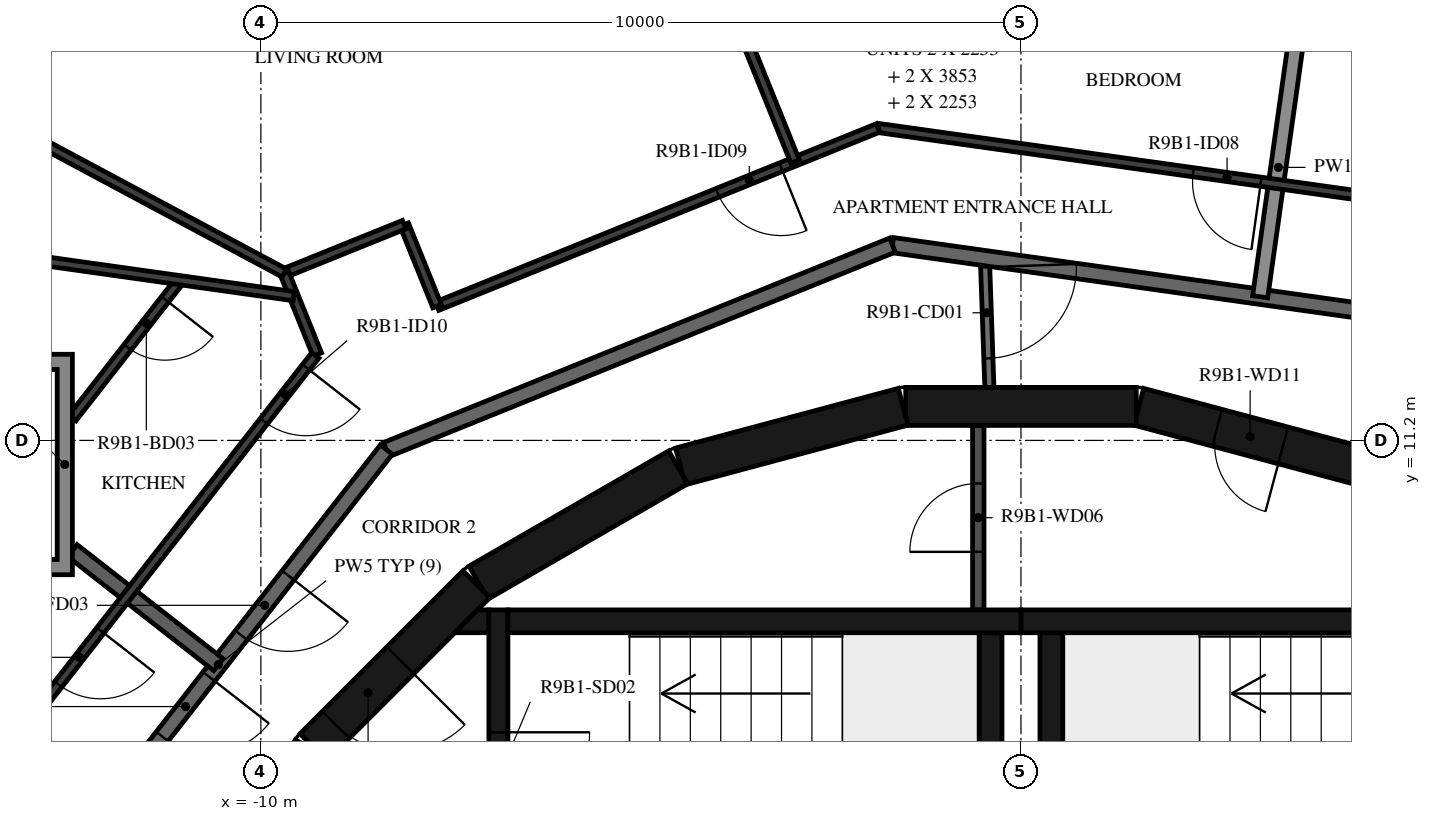
"""IFC4 building model, lengths in metres.
Left out: names, types, materials, properties, quantities, classifications, styles, units other than length and angle.
Written with IfcOpenShell. Run it as: python <this file> out.ifc"""

import sys

from ifc_helpers import new_model, si_unit, direction, frame, frame_2d, origin, place, context, subcontext, project, spatial, polyline, rectangle, outline, extrude, element, fill, save


model = new_model("IFC4")
c1 = context("Model", 3, precision=1e-05, world=origin(), true_north=direction((0.0, 1.0)))
c2 = subcontext(c1, "Body", "Model", "MODEL_VIEW")
j1 = project(units=[si_unit("LENGTHUNIT", "METRE"), si_unit("PLANEANGLEUNIT", "RADIAN")], contexts=[c1])
p1 = place(None, origin())
s1 = spatial("IfcSite", under=j1, at=p1, CompositionType="ELEMENT")
p2 = place(p1, origin())
s2 = spatial("IfcBuilding", under=s1, at=p2, CompositionType="ELEMENT")
p3 = place(p2, frame((0.0, 0.0, 350.5)))
s3 = spatial("IfcBuildingStorey", under=s2, at=p3, CompositionType="ELEMENT", Elevation=350.5)
p4 = place(p3, frame((4.479, 10.858, 0.0), z_axis=(0.0, 0.0, 1.0), x_axis=(-0.965948410781, 0.258734743916, 0.0)))
e1 = element("IfcWall", 1, at=p4, inside=s3, PredefinedType="SHEAR", context=c2, shape_type="SweptSolid", body=[
    extrude(rectangle(XDim=3.033, YDim=0.5, at=frame_2d((1.516, 0.0))), origin(), (0.0, 0.0, 1.0), 3.12),
])
p5 = place(p4, frame((1.066, 0.0, 0.0)))
e2 = element("IfcOpeningElement", 2, at=p5, cuts=e1, PredefinedType="OPENING", context=c2, shape_type="SweptSolid", body=[
    extrude(rectangle(XDim=0.9, YDim=2.1, at=frame_2d((0.45, 1.05))), frame((0.0, 0.26, 0.0), z_axis=(0.0, -1.0, 0.0), x_axis=(1.0, 0.0, 0.0)), (0.0, 0.0, 1.0), 0.52),
])
for number, where, z_axis, x_axis in (
    (3, (1.516, 11.647, 0.0), (0.0, 0.0, 1.0), (-1.0, 0.0, 0.0)),
    (4, (-1.55, 11.643, 0.0), (0.0, 0.0, 1.0), (-0.966, -0.259, 0.0)),
    (5, (-4.51, 10.845, 0.0), (0.0, 0.0, 1.0), (-0.866, -0.5, 0.0)),
):
    element("IfcWall", number, at=place(p3, frame(where, z_axis=z_axis, x_axis=x_axis)), inside=s3, PredefinedType="SHEAR", context=c2, shape_type="SweptSolid", body=[
        extrude(rectangle(XDim=3.033, YDim=0.5, at=frame_2d((1.516, 0.0))), origin(), (0.0, 0.0, 1.0), 3.12),
    ])
p6 = place(p3, frame((-7.164, 9.308, 0.0), z_axis=(0.0, 0.0, 1.0), x_axis=(-0.707106781187, -0.707106781187, 0.0)))
e6 = element("IfcWall", 6, at=p6, inside=s3, PredefinedType="SHEAR", context=c2, shape_type="SweptSolid", body=[
    extrude(rectangle(XDim=3.032, YDim=0.5, at=frame_2d((1.516, 0.0))), origin(), (0.0, 0.0, 1.0), 3.12),
])
p7 = place(p6, frame((1.416, 0.0, 0.0)))
e7 = element("IfcOpeningElement", 7, at=p7, cuts=e6, PredefinedType="OPENING", context=c2, shape_type="SweptSolid", body=[
    extrude(rectangle(XDim=1.2, YDim=2.1, at=frame_2d((0.6, 1.05))), frame((0.0, 0.26, 0.0), z_axis=(0.0, -1.0, 0.0), x_axis=(1.0, 0.0, 0.0)), (0.0, 0.0, 1.0), 0.52),
])
p8 = place(p3, frame((-9.329, 7.137, 0.0), z_axis=(0.0, 0.0, 1.0), x_axis=(-0.500087131594, -0.865975092491, 0.0)))
e8 = element("IfcWall", 8, at=p8, inside=s3, PredefinedType="SHEAR", context=c2, shape_type="SweptSolid", body=[
    extrude(rectangle(XDim=3.033, YDim=0.5, at=frame_2d((1.516, 0.0))), origin(), (0.0, 0.0, 1.0), 3.12),
])
p9 = place(p3, frame((0.0, 8.82, 0.0), z_axis=(0.0, 0.0, 1.0), x_axis=(1.0, 0.0, 0.0)))
e9 = element("IfcWall", 9, at=p9, inside=s3, PredefinedType="SHEAR", context=c2, shape_type="SweptSolid", body=[
    extrude(rectangle(XDim=6.75, YDim=0.3, at=frame_2d((3.375, 0.0))), origin(), (0.0, 0.0, 1.0), 3.12),
])
p10 = place(p3, frame((0.4, 5.35, 0.0), z_axis=(0.0, 0.0, 1.0), x_axis=(0.0, 1.0, 0.0)))
e10 = element("IfcWall", 10, at=p10, inside=s3, PredefinedType="SHEAR", context=c2, shape_type="SweptSolid", body=[
    extrude(rectangle(XDim=3.32, YDim=0.3, at=frame_2d((1.66, 0.0))), origin(), (0.0, 0.0, 1.0), 3.12),
])
p11 = place(p3, frame((-6.75, 8.82, 0.0), z_axis=(0.0, 0.0, 1.0), x_axis=(1.0, 0.0, 0.0)))
e11 = element("IfcWall", 11, at=p11, inside=s3, PredefinedType="SHEAR", context=c2, shape_type="SweptSolid", body=[
    extrude(rectangle(XDim=6.75, YDim=0.3, at=frame_2d((3.375, 0.0))), origin(), (0.0, 0.0, 1.0), 3.12),
])
p12 = place(p3, frame((-0.4, 5.35, 0.0), z_axis=(0.0, 0.0, 1.0), x_axis=(0.0, 1.0, 0.0)))
e12 = element("IfcWall", 12, at=p12, inside=s3, PredefinedType="SHEAR", context=c2, shape_type="SweptSolid", body=[
    extrude(rectangle(XDim=3.32, YDim=0.3, at=frame_2d((1.66, 0.0))), origin(), (0.0, 0.0, 1.0), 3.12),
])
p13 = place(p3, frame((-6.875, 8.97, 0.0), z_axis=(0.0, 0.0, 1.0), x_axis=(0.0, -1.0, 0.0)))
e13 = element("IfcWall", 13, at=p13, inside=s3, PredefinedType="SHEAR", context=c2, shape_type="SweptSolid", body=[
    extrude(rectangle(XDim=3.92, YDim=0.25, at=frame_2d((1.96, 0.0))), origin(), (0.0, 0.0, 1.0), 3.12),
])
p14 = place(p13, frame((1.61, 0.0, 0.0)))
e14 = element("IfcOpeningElement", 14, at=p14, cuts=e13, PredefinedType="OPENING", context=c2, shape_type="SweptSolid", body=[
    extrude(rectangle(XDim=1.2, YDim=2.1, at=frame_2d((0.6, 1.05))), frame((0.0, 0.135, 0.0), z_axis=(0.0, -1.0, 0.0), x_axis=(1.0, 0.0, 0.0)), (0.0, 0.0, 1.0), 0.27),
])
p15 = place(p3, origin())
e15 = element("IfcWall", 15, at=p15, inside=s3, PredefinedType="SHEAR", context=c2, shape_type="SweptSolid", body=[
    extrude(outline(polyline([(-7.148, 8.97), (-7.0, 8.97), (-7.0, 8.67), (-7.448, 8.67), (-7.148, 8.97)])), origin(), (0.0, 0.0, 1.0), 3.12),
])
p16 = place(p3, frame((-0.562, 8.97, 0.0), z_axis=(0.0, 0.0, 1.0), x_axis=(0.0, 1.0, 0.0)))
e16 = element("IfcWall", 16, at=p16, inside=s3, PredefinedType="PARTITIONING", context=c2, shape_type="SweptSolid", body=[
    extrude(rectangle(XDim=2.427, YDim=0.15, at=frame_2d((1.214, 0.0))), origin(), (0.0, 0.0, 1.0), 3.12),
])
p17 = place(p16, frame((0.764, 0.0, 0.0)))
e17 = element("IfcOpeningElement", 17, at=p17, cuts=e16, PredefinedType="OPENING", context=c2, shape_type="SweptSolid", body=[
    extrude(rectangle(XDim=0.9, YDim=2.1, at=frame_2d((0.45, 1.05))), frame((0.0, 0.085, 0.0), z_axis=(0.0, -1.0, 0.0), x_axis=(1.0, 0.0, 0.0)), (0.0, 0.0, 1.0), 0.17),
])
p18 = place(p3, frame((-0.475, 13.598, 0.0), z_axis=(0.0, 0.0, 1.0), x_axis=(0.034852521429, -0.999392466326, 0.0)))
e18 = element("IfcWall", 18, at=p18, inside=s3, PredefinedType="PARTITIONING", context=c2, shape_type="SweptSolid", body=[
    extrude(rectangle(XDim=1.702, YDim=0.12, at=frame_2d((0.851, 0.0))), origin(), (0.0, 0.0, 1.0), 3.12),
])
p19 = place(p18, frame((0.12, 0.0, 0.0)))
e19 = element("IfcOpeningElement", 19, at=p19, cuts=e18, PredefinedType="OPENING", context=c2, shape_type="SweptSolid", body=[
    extrude(rectangle(XDim=1.2, YDim=2.1, at=frame_2d((0.6, 1.05))), frame((0.0, 0.07, 0.0), z_axis=(0.0, -1.0, 0.0), x_axis=(1.0, 0.0, 0.0)), (0.0, 0.0, 1.0), 0.14),
])
p20 = place(p3, frame((5.42, 12.77, 0.0), z_axis=(0.0, 0.0, 1.0), x_axis=(-0.990270565508, 0.139155334385, 0.0)))
e20 = element("IfcWall", 20, at=p20, inside=s3, PredefinedType="STANDARD", context=c2, shape_type="SweptSolid", body=[
    extrude(rectangle(XDim=7.181, YDim=0.2, at=frame_2d((3.59, 0.0))), origin(), (0.0, 0.0, 1.0), 3.12),
])
p21 = place(p3, frame((-1.691, 13.769, 0.0), z_axis=(0.0, 0.0, 1.0), x_axis=(-0.92717916932, -0.374618189599, 0.0)))
e21 = element("IfcWall", 21, at=p21, inside=s3, PredefinedType="STANDARD", context=c2, shape_type="SweptSolid", body=[
    extrude(rectangle(XDim=7.181, YDim=0.2, at=frame_2d((3.591, 0.0))), origin(), (0.0, 0.0, 1.0), 3.12),
])
p22 = place(p3, frame((-8.349, 11.079, 0.0), z_axis=(0.0, 0.0, 1.0), x_axis=(-0.615669112324, -0.78800478687, 0.0)))
e22 = element("IfcWall", 22, at=p22, inside=s3, PredefinedType="STANDARD", context=c2, shape_type="SweptSolid", body=[
    extrude(rectangle(XDim=7.181, YDim=0.2, at=frame_2d((3.591, 0.0))), origin(), (0.0, 0.0, 1.0), 3.12),
])
p23 = place(p22, frame((2.1, 0.0, 0.0)))
e23 = element("IfcOpeningElement", 23, at=p23, cuts=e22, PredefinedType="OPENING", context=c2, shape_type="SweptSolid", body=[
    extrude(rectangle(XDim=1.0, YDim=2.1, at=frame_2d((0.5, 1.05))), frame((0.0, 0.11, 0.0), z_axis=(0.0, -1.0, 0.0), x_axis=(1.0, 0.0, 0.0)), (0.0, 0.0, 1.0), 0.22),
])
p24 = place(p22, frame((3.79, 0.0, 0.0)))
e24 = element("IfcOpeningElement", 24, at=p24, cuts=e22, PredefinedType="OPENING", context=c2, shape_type="SweptSolid", body=[
    extrude(rectangle(XDim=1.0, YDim=2.1, at=frame_2d((0.5, 1.05))), frame((0.0, 0.11, 0.0), z_axis=(0.0, -1.0, 0.0), x_axis=(1.0, 0.0, 0.0)), (0.0, 0.0, 1.0), 0.22),
])
p25 = place(p3, frame((3.625, 16.494, 0.0), z_axis=(0.0, 0.0, 1.0), x_axis=(-0.139174320859, -0.990267897295, 0.0)))
e25 = element("IfcWall", 25, at=p25, inside=s3, PredefinedType="STANDARD", context=c2, shape_type="SweptSolid", body=[
    extrude(rectangle(XDim=3.438, YDim=0.2, at=frame_2d((1.719, 0.0))), origin(), (0.0, 0.0, 1.0), 2.73),
])
p26 = place(p3, frame((-12.479, 9.75, 0.0), z_axis=(0.0, 0.0, 1.0), x_axis=(0.788050197026, -0.615610986717, 0.0)))
e26 = element("IfcWall", 26, at=p26, inside=s3, PredefinedType="STANDARD", context=c2, shape_type="SweptSolid", body=[
    extrude(rectangle(XDim=2.437, YDim=0.2, at=frame_2d((1.218, 0.0))), origin(), (0.0, 0.0, 1.0), 3.12),
])
p27 = place(p3, frame((6.027, 14.199, 0.0), z_axis=(0.0, 0.0, 1.0), x_axis=(-0.990271593532, 0.139148018469, 0.0)))
e27 = element("IfcWall", 27, at=p27, inside=s3, PredefinedType="PARTITIONING", context=c2, shape_type="SweptSolid", body=[
    extrude(rectangle(XDim=7.985, YDim=0.12, at=frame_2d((3.992, 0.0))), origin(), (0.0, 0.0, 1.0), 3.12),
])
p28 = place(p27, frame((2.898, 0.0, 0.0)))
e28 = element("IfcOpeningElement", 28, at=p28, cuts=e27, PredefinedType="OPENING", context=c2, shape_type="SweptSolid", body=[
    extrude(rectangle(XDim=0.9, YDim=2.1, at=frame_2d((0.45, 1.05))), frame((0.0, 0.07, 0.0), z_axis=(0.0, -1.0, 0.0), x_axis=(1.0, 0.0, 0.0)), (0.0, 0.0, 1.0), 0.14),
])
p29 = place(p3, frame((-1.88, 15.311, 0.0), z_axis=(0.0, 0.0, 1.0), x_axis=(-0.927182163322, -0.374610779365, 0.0)))
e29 = element("IfcWall", 29, at=p29, inside=s3, PredefinedType="PARTITIONING", context=c2, shape_type="SweptSolid", body=[
    extrude(rectangle(XDim=6.257, YDim=0.12, at=frame_2d((3.128, 0.0))), origin(), (0.0, 0.0, 1.0), 3.12),
])
p30 = place(p29, frame((1.377, 0.0, 0.0)))
e30 = element("IfcOpeningElement", 30, at=p30, cuts=e29, PredefinedType="OPENING", context=c2, shape_type="SweptSolid", body=[
    extrude(rectangle(XDim=0.9, YDim=2.1, at=frame_2d((0.45, 1.05))), frame((0.0, 0.07, 0.0), z_axis=(0.0, -1.0, 0.0), x_axis=(1.0, 0.0, 0.0)), (0.0, 0.0, 1.0), 0.14),
])
p31 = place(p3, frame((-7.681, 12.967, 0.0), z_axis=(0.0, 0.0, 1.0), x_axis=(-0.374592224266, 0.927189659951, 0.0)))
e31 = element("IfcWall", 31, at=p31, inside=s3, PredefinedType="PARTITIONING", context=c2, shape_type="SweptSolid", body=[
    extrude(rectangle(XDim=1.156, YDim=0.12, at=frame_2d((0.578, 0.0))), origin(), (0.0, 0.0, 1.0), 3.12),
])
p32 = place(p3, frame((-8.115, 14.039, 0.0), z_axis=(0.0, 0.0, 1.0), x_axis=(-0.927153589835, -0.374681492546, 0.0)))
e32 = element("IfcWall", 32, at=p32, inside=s3, PredefinedType="PARTITIONING", context=c2, shape_type="SweptSolid", body=[
    extrude(rectangle(XDim=1.7, YDim=0.12, at=frame_2d((0.85, 0.0))), origin(), (0.0, 0.0, 1.0), 3.12),
])
p33 = place(p3, frame((-9.691, 13.402, 0.0), z_axis=(0.0, 0.0, 1.0), x_axis=(0.374484003097, -0.927233374844, 0.0)))
e33 = element("IfcWall", 33, at=p33, inside=s3, PredefinedType="PARTITIONING", context=c2, shape_type="SweptSolid", body=[
    extrude(rectangle(XDim=1.156, YDim=0.12, at=frame_2d((0.578, 0.0))), origin(), (0.0, 0.0, 1.0), 3.12),
])
p34 = place(p3, frame((-9.283, 12.319, 0.0), z_axis=(0.0, 0.0, 1.0), x_axis=(-0.61567489546, -0.788000268464, 0.0)))
e34 = element("IfcWall", 34, at=p34, inside=s3, PredefinedType="PARTITIONING", context=c2, shape_type="SweptSolid", body=[
    extrude(rectangle(XDim=7.985, YDim=0.12, at=frame_2d((3.992, 0.0))), origin(), (0.0, 0.0, 1.0), 3.12),
])
p35 = place(p34, frame((0.2, 0.0, 0.0)))
e35 = element("IfcOpeningElement", 35, at=p35, cuts=e34, PredefinedType="OPENING", context=c2, shape_type="SweptSolid", body=[
    extrude(rectangle(XDim=0.9, YDim=2.1, at=frame_2d((0.45, 1.05))), frame((0.0, 0.07, 0.0), z_axis=(0.0, -1.0, 0.0), x_axis=(1.0, 0.0, 0.0)), (0.0, 0.0, 1.0), 0.14),
])
p36 = place(p34, frame((4.592, 0.0, 0.0)))
e36 = element("IfcOpeningElement", 36, at=p36, cuts=e34, PredefinedType="OPENING", context=c2, shape_type="SweptSolid", body=[
    extrude(rectangle(XDim=0.9, YDim=2.1, at=frame_2d((0.45, 1.05))), frame((0.0, 0.07, 0.0), z_axis=(0.0, -1.0, 0.0), x_axis=(1.0, 0.0, 0.0)), (0.0, 0.0, 1.0), 0.14),
])
p37 = place(p3, frame((-4.065, 17.575, 0.0), z_axis=(0.0, 0.0, 1.0), x_axis=(0.374619347258, -0.927178701578, 0.0)))
e37 = element("IfcWall", 37, at=p37, inside=s3, PredefinedType="PARTITIONING", context=c2, shape_type="SweptSolid", body=[
    extrude(rectangle(XDim=2.918, YDim=0.12, at=frame_2d((1.459, 0.0))), origin(), (0.0, 0.0, 1.0), 3.12),
])
p38 = place(p3, frame((-17.896, 17.797, 0.0), z_axis=(0.0, 0.0, 1.0), x_axis=(0.88150492406, -0.4721748287, 0.0)))
e38 = element("IfcWall", 38, at=p38, inside=s3, PredefinedType="PARTITIONING", context=c2, shape_type="SweptSolid", body=[
    extrude(rectangle(XDim=9.308, YDim=0.12, at=frame_2d((4.654, 0.0))), origin(), (0.0, 0.0, 1.0), 3.12),
])
p39 = place(p38, frame((0.6, 0.0, 0.0)))
e39 = element("IfcOpeningElement", 39, at=p39, cuts=e38, PredefinedType="OPENING", context=c2, shape_type="SweptSolid", body=[
    extrude(rectangle(XDim=0.9, YDim=2.1, at=frame_2d((0.45, 1.05))), frame((0.0, 0.07, 0.0), z_axis=(0.0, -1.0, 0.0), x_axis=(1.0, 0.0, 0.0)), (0.0, 0.0, 1.0), 0.14),
])
p40 = place(p3, frame((-11.064, 13.308, 0.0), z_axis=(0.0, 0.0, 1.0), x_axis=(-0.615681126827, -0.787995399777, 0.0)))
e40 = element("IfcWall", 40, at=p40, inside=s3, PredefinedType="PARTITIONING", context=c2, shape_type="SweptSolid", body=[
    extrude(rectangle(XDim=2.3, YDim=0.12, at=frame_2d((1.15, 0.0))), origin(), (0.0, 0.0, 1.0), 3.12),
])
p41 = place(p40, frame((0.32, 0.0, 0.0)))
e41 = element("IfcOpeningElement", 41, at=p41, cuts=e40, PredefinedType="OPENING", context=c2, shape_type="SweptSolid", body=[
    extrude(rectangle(XDim=0.8, YDim=2.1, at=frame_2d((0.4, 1.05))), frame((0.0, 0.07, 0.0), z_axis=(0.0, -1.0, 0.0), x_axis=(1.0, 0.0, 0.0)), (0.0, 0.0, 1.0), 0.14),
])
p42 = place(p3, frame((-9.568, 13.097, 0.0), z_axis=(0.0, 0.0, 1.0), x_axis=(-0.990266931728, 0.13918119099, 0.0)))
e42 = element("IfcWall", 42, at=p42, inside=s3, PredefinedType="PARTITIONING", context=c2, shape_type="SweptSolid", body=[
    extrude(rectangle(XDim=3.708, YDim=0.12, at=frame_2d((1.854, 0.0))), origin(), (0.0, 0.0, 1.0), 3.12),
])
p43 = place(p3, origin())
e43 = element("IfcWall", 43, at=p43, inside=s3, PredefinedType="STANDARD", context=c2, shape_type="SweptSolid", body=[
    extrude(outline(polyline([(-12.479, 12.333), (-12.479, 9.433), (-15.379, 9.433), (-15.379, 12.333), (-12.479, 12.333)]), holes=[polyline([(-15.179, 9.633), (-12.679, 9.633), (-12.679, 12.133), (-15.179, 12.133), (-15.179, 9.633)])]), origin(), (0.0, 0.0, 1.0), 3.12),
])
p44 = place(p14, origin())
e44 = element("IfcDoor", 44, at=p44, inside=s3, OperationType="SINGLE_SWING_LEFT", PredefinedType="DOOR", context=c2, shape_type="SweptSolid", body=[
    extrude(rectangle(XDim=1.2, YDim=2.1, at=frame_2d((0.6, 1.05))), frame((0.0, 0.025, 0.0), z_axis=(0.0, -1.0, 0.0), x_axis=(1.0, 0.0, 0.0)), (0.0, 0.0, 1.0), 0.05),
])
fill(e14, e44)
p45 = place(p7, origin())
e45 = element("IfcDoor", 45, at=p45, inside=s3, OperationType="SINGLE_SWING_RIGHT", PredefinedType="DOOR", context=c2, shape_type="SweptSolid", body=[
    extrude(rectangle(XDim=1.2, YDim=2.1, at=frame_2d((0.6, 1.05))), frame((0.0, 0.025, 0.0), z_axis=(0.0, -1.0, 0.0), x_axis=(1.0, 0.0, 0.0)), (0.0, 0.0, 1.0), 0.05),
])
fill(e7, e45)
p46 = place(p17, origin())
e46 = element("IfcDoor", 46, at=p46, inside=s3, OperationType="SINGLE_SWING_RIGHT", PredefinedType="DOOR", context=c2, shape_type="SweptSolid", body=[
    extrude(rectangle(XDim=0.9, YDim=2.1, at=frame_2d((0.45, 1.05))), frame((0.0, 0.025, 0.0), z_axis=(0.0, -1.0, 0.0), x_axis=(1.0, 0.0, 0.0)), (0.0, 0.0, 1.0), 0.05),
])
fill(e17, e46)
p47 = place(p5, origin())
e47 = element("IfcDoor", 47, at=p47, inside=s3, OperationType="SINGLE_SWING_LEFT", PredefinedType="DOOR", context=c2, shape_type="SweptSolid", body=[
    extrude(rectangle(XDim=0.9, YDim=2.1, at=frame_2d((0.45, 1.05))), frame((0.0, 0.025, 0.0), z_axis=(0.0, -1.0, 0.0), x_axis=(1.0, 0.0, 0.0)), (0.0, 0.0, 1.0), 0.05),
])
fill(e2, e47)
p48 = place(p23, origin())
e48 = element("IfcDoor", 48, at=p48, inside=s3, OperationType="SINGLE_SWING_RIGHT", PredefinedType="DOOR", context=c2, shape_type="SweptSolid", body=[
    extrude(rectangle(XDim=1.0, YDim=2.1, at=frame_2d((0.5, 1.05))), frame((0.0, 0.025, 0.0), z_axis=(0.0, -1.0, 0.0), x_axis=(1.0, 0.0, 0.0)), (0.0, 0.0, 1.0), 0.05),
])
fill(e23, e48)
p49 = place(p28, origin())
e49 = element("IfcDoor", 49, at=p49, inside=s3, OperationType="SINGLE_SWING_LEFT", PredefinedType="DOOR", context=c2, shape_type="SweptSolid", body=[
    extrude(rectangle(XDim=0.9, YDim=2.1, at=frame_2d((0.45, 1.05))), frame((0.0, 0.025, 0.0), z_axis=(0.0, -1.0, 0.0), x_axis=(1.0, 0.0, 0.0)), (0.0, 0.0, 1.0), 0.05),
])
fill(e28, e49)
p50 = place(p30, origin())
e50 = element("IfcDoor", 50, at=p50, inside=s3, OperationType="SINGLE_SWING_RIGHT", PredefinedType="DOOR", context=c2, shape_type="SweptSolid", body=[
    extrude(rectangle(XDim=0.9, YDim=2.1, at=frame_2d((0.45, 1.05))), frame((0.0, 0.025, 0.0), z_axis=(0.0, -1.0, 0.0), x_axis=(1.0, 0.0, 0.0)), (0.0, 0.0, 1.0), 0.05),
])
fill(e30, e50)
p51 = place(p35, origin())
e51 = element("IfcDoor", 51, at=p51, inside=s3, OperationType="SINGLE_SWING_RIGHT", PredefinedType="DOOR", context=c2, shape_type="SweptSolid", body=[
    extrude(rectangle(XDim=0.9, YDim=2.1, at=frame_2d((0.45, 1.05))), frame((0.0, 0.025, 0.0), z_axis=(0.0, -1.0, 0.0), x_axis=(1.0, 0.0, 0.0)), (0.0, 0.0, 1.0), 0.05),
])
fill(e35, e51)
p52 = place(p41, origin())
e52 = element("IfcDoor", 52, at=p52, inside=s3, OperationType="SINGLE_SWING_RIGHT", PredefinedType="DOOR", context=c2, shape_type="SweptSolid", body=[
    extrude(rectangle(XDim=0.8, YDim=2.1, at=frame_2d((0.4, 1.05))), frame((0.0, 0.025, 0.0), z_axis=(0.0, -1.0, 0.0), x_axis=(1.0, 0.0, 0.0)), (0.0, 0.0, 1.0), 0.05),
])
fill(e41, e52)
p53 = place(p24, origin())
e53 = element("IfcDoor", 53, at=p53, inside=s3, OperationType="SINGLE_SWING_LEFT", PredefinedType="DOOR", context=c2, shape_type="SweptSolid", body=[
    extrude(rectangle(XDim=1.0, YDim=2.1, at=frame_2d((0.5, 1.05))), frame((0.0, 0.025, 0.0), z_axis=(0.0, -1.0, 0.0), x_axis=(1.0, 0.0, 0.0)), (0.0, 0.0, 1.0), 0.05),
])
fill(e24, e53)
p54 = place(p36, origin())
e54 = element("IfcDoor", 54, at=p54, inside=s3, OperationType="SINGLE_SWING_LEFT", PredefinedType="DOOR", context=c2, shape_type="SweptSolid", body=[
    extrude(rectangle(XDim=0.9, YDim=2.1, at=frame_2d((0.45, 1.05))), frame((0.0, 0.025, 0.0), z_axis=(0.0, -1.0, 0.0), x_axis=(1.0, 0.0, 0.0)), (0.0, 0.0, 1.0), 0.05),
])
fill(e36, e54)
p55 = place(p19, origin())
e55 = element("IfcDoor", 55, at=p55, inside=s3, OperationType="DOUBLE_DOOR_SINGLE_SWING", PredefinedType="DOOR", context=c2, shape_type="SweptSolid", body=[
    extrude(rectangle(XDim=1.2, YDim=2.1, at=frame_2d((0.6, 1.05))), frame((0.0, 0.025, 0.0), z_axis=(0.0, -1.0, 0.0), x_axis=(1.0, 0.0, 0.0)), (0.0, 0.0, 1.0), 0.05),
])
fill(e19, e55)
save(model, sys.argv[1])
